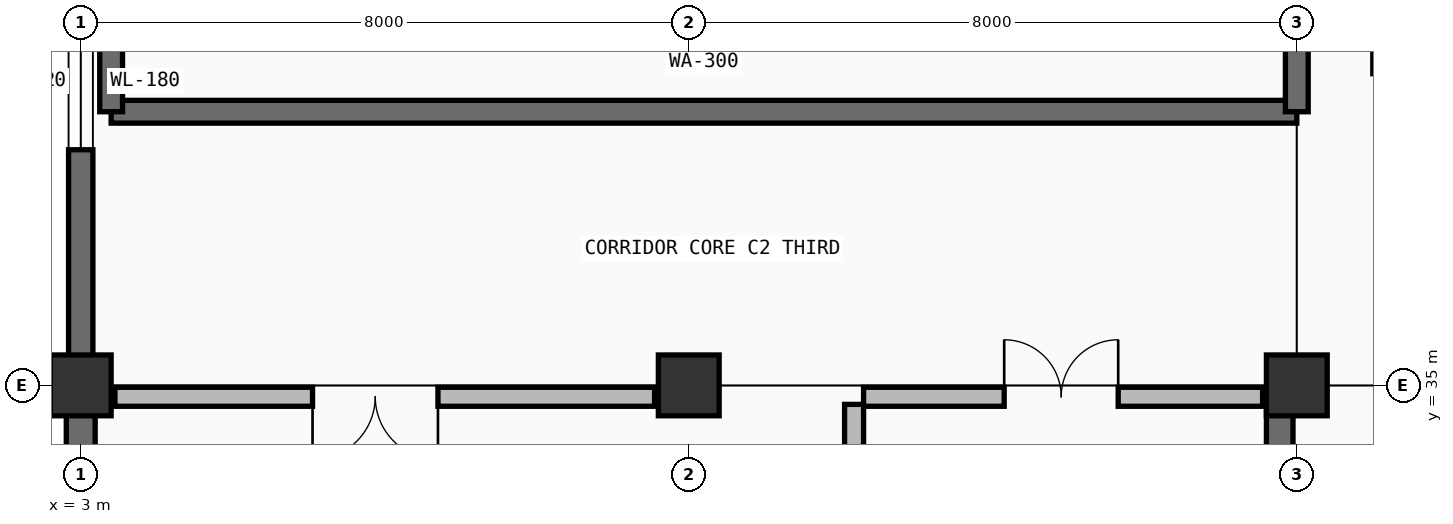
"""IFC4 building model, lengths in metres.
Left out: names, types, materials, properties, quantities, classifications, styles, units other than length and angle.
Written with IfcOpenShell. Run it as: python <this file> out.ifc"""

import sys

from ifc_helpers import new_model, si_unit, direction, frame, frame_2d, origin, origin_2d, place, context, subcontext, project, spatial, rectangle, extrude, element, fill, save


model = new_model("IFC4")
c1 = context("Model", 3, precision=1e-05, world=origin(), true_north=direction((0.0, 1.0)))
c2 = subcontext(c1, "Body", "Model", "MODEL_VIEW")
j1 = project(units=[si_unit("LENGTHUNIT", "METRE"), si_unit("PLANEANGLEUNIT", "RADIAN")], contexts=[c1])
p1 = place(None, origin())
s1 = spatial("IfcSite", under=j1, at=p1, CompositionType="ELEMENT")
p2 = place(p1, origin())
s2 = spatial("IfcBuilding", under=s1, at=p2, CompositionType="ELEMENT")
p3 = place(p2, frame((0.0, 0.0, 14.4)))
s3 = spatial("IfcBuildingStorey", under=s2, at=p3, CompositionType="ELEMENT", Elevation=14.4)
for number, where, z_axis, x_axis in (
    (1, (3.0, 35.0, 0.0), (0.0, 0.0, 1.0), (1.0, 0.0, 0.0)),
    (2, (11.0, 35.0, 0.0), (0.0, 0.0, 1.0), (1.0, 0.0, 0.0)),
    (3, (19.0, 35.0, 0.0), (0.0, 0.0, 1.0), (1.0, 0.0, 0.0)),
):
    element("IfcColumn", number, at=place(p3, frame(where, z_axis=z_axis, x_axis=x_axis)), inside=s3, PredefinedType="COLUMN", context=c2, shape_type="SweptSolid", body=[
        extrude(rectangle(XDim=0.8, YDim=0.8, at=origin_2d()), origin(), (0.0, 0.0, 1.0), 4.5),
    ])
p4 = place(p3, frame((3.0, 27.0, 0.0), z_axis=(0.0, 0.0, 1.0), x_axis=(0.0, 1.0, 0.0)))
e4 = element("IfcWall", 4, at=p4, inside=s3, PredefinedType="SOLIDWALL", context=c2, shape_type="SweptSolid", body=[
    extrude(rectangle(XDim=8.0, YDim=0.38, at=frame_2d((4.0, 0.0))), origin(), (0.0, 0.0, 1.0), 4.5),
])
p5 = place(p3, frame((3.0, 35.0, 0.0), z_axis=(0.0, 0.0, 1.0), x_axis=(0.0, 1.0, 0.0)))
e5 = element("IfcWall", 5, at=p5, inside=s3, PredefinedType="SOLIDWALL", context=c2, shape_type="SweptSolid", body=[
    extrude(rectangle(XDim=8.0, YDim=0.32, at=frame_2d((4.0, 0.0))), origin(), (0.0, 0.0, 1.0), 4.5),
])
p6 = place(p5, frame((3.1, 0.0, 1.1)))
e6 = element("IfcOpeningElement", 6, at=p6, cuts=e5, PredefinedType="OPENING", context=c2, shape_type="SweptSolid", body=[
    extrude(rectangle(XDim=1.8, YDim=0.85, at=frame_2d((0.9, 0.425))), frame((0.0, 0.17, 0.0), z_axis=(0.0, -1.0, 0.0), x_axis=(1.0, 0.0, 0.0)), (0.0, 0.0, 1.0), 0.34),
])
p7 = place(p3, frame((18.775, 27.2, 0.0), z_axis=(0.0, 0.0, 1.0), x_axis=(0.0, 1.0, 0.0)))
e7 = element("IfcWall", 7, at=p7, inside=s3, PredefinedType="SHEAR", context=c2, shape_type="SweptSolid", body=[
    extrude(rectangle(XDim=7.6, YDim=0.35, at=frame_2d((3.8, 0.0))), origin(), (0.0, 0.0, 1.0), 4.2),
])
p8 = place(p7, frame((5.1, 0.0, 0.0)))
e8 = element("IfcOpeningElement", 8, at=p8, cuts=e7, PredefinedType="OPENING", context=c2, shape_type="SweptSolid", body=[
    extrude(rectangle(XDim=1.5, YDim=2.2, at=frame_2d((0.75, 1.1))), frame((0.0, 0.185, 0.0), z_axis=(0.0, -1.0, 0.0), x_axis=(1.0, 0.0, 0.0)), (0.0, 0.0, 1.0), 0.37),
])
p9 = place(p3, frame((13.175, 31.775, 0.0), z_axis=(0.0, 0.0, 1.0), x_axis=(0.0, 1.0, 0.0)))
e9 = element("IfcWall", 9, at=p9, inside=s3, PredefinedType="PARTITIONING", context=c2, shape_type="SweptSolid", body=[
    extrude(rectangle(XDim=2.975, YDim=0.25, at=frame_2d((1.488, 0.0))), origin(), (0.0, 0.0, 1.0), 4.2),
])
p10 = place(p9, frame((0.45, 0.0, 0.0)))
e10 = element("IfcOpeningElement", 10, at=p10, cuts=e9, PredefinedType="OPENING", context=c2, shape_type="SweptSolid", body=[
    extrude(rectangle(XDim=1.2, YDim=2.2, at=frame_2d((0.6, 1.1))), frame((0.0, 0.135, 0.0), z_axis=(0.0, -1.0, 0.0), x_axis=(1.0, 0.0, 0.0)), (0.0, 0.0, 1.0), 0.27),
])
p11 = place(p3, frame((3.45, 34.85, 0.0), z_axis=(0.0, 0.0, 1.0), x_axis=(1.0, 0.0, 0.0)))
e11 = element("IfcWall", 11, at=p11, inside=s3, PredefinedType="PARTITIONING", context=c2, shape_type="SweptSolid", body=[
    extrude(rectangle(XDim=7.1, YDim=0.25, at=frame_2d((3.55, 0.0))), origin(), (0.0, 0.0, 1.0), 3.535),
])
p12 = place(p11, frame((2.6, 0.0, 0.0)))
e12 = element("IfcOpeningElement", 12, at=p12, cuts=e11, PredefinedType="OPENING", context=c2, shape_type="SweptSolid", body=[
    extrude(rectangle(XDim=1.65, YDim=2.25, at=frame_2d((0.825, 1.125))), frame((0.0, 0.135, 0.0), z_axis=(0.0, -1.0, 0.0), x_axis=(1.0, 0.0, 0.0)), (0.0, 0.0, 1.0), 0.27),
])
p13 = place(p3, frame((13.3, 34.85, 0.0), z_axis=(0.0, 0.0, 1.0), x_axis=(1.0, 0.0, 0.0)))
e13 = element("IfcWall", 13, at=p13, inside=s3, PredefinedType="PARTITIONING", context=c2, shape_type="SweptSolid", body=[
    extrude(rectangle(XDim=5.25, YDim=0.25, at=frame_2d((2.625, 0.0))), origin(), (0.0, 0.0, 1.0), 3.535),
])
p14 = place(p13, frame((1.85, 0.0, 0.0)))
e14 = element("IfcOpeningElement", 14, at=p14, cuts=e13, PredefinedType="OPENING", context=c2, shape_type="SweptSolid", body=[
    extrude(rectangle(XDim=1.5, YDim=2.2, at=frame_2d((0.75, 1.1))), frame((0.0, 0.135, 0.0), z_axis=(0.0, -1.0, 0.0), x_axis=(1.0, 0.0, 0.0)), (0.0, 0.0, 1.0), 0.27),
])
p15 = place(p3, frame((3.4, 38.6, 0.0), z_axis=(0.0, 0.0, 1.0), x_axis=(1.0, 0.0, 0.0)))
e15 = element("IfcWall", 15, at=p15, inside=s3, PredefinedType="SHEAR", context=c2, shape_type="SweptSolid", body=[
    extrude(rectangle(XDim=15.6, YDim=0.3, at=frame_2d((7.8, 0.0))), origin(), (0.0, 0.0, 1.0), 4.2),
])
p16 = place(p3, frame((19.0, 38.6, 0.0), z_axis=(0.0, 0.0, 1.0), x_axis=(0.0, 1.0, 0.0)))
e16 = element("IfcWall", 16, at=p16, inside=s3, PredefinedType="SHEAR", context=c2, shape_type="SweptSolid", body=[
    extrude(rectangle(XDim=13.4, YDim=0.3, at=frame_2d((6.7, 0.0))), origin(), (0.0, 0.0, 1.0), 4.2),
])
p17 = place(p16, frame((7.674, 0.0, 0.0)))
e17 = element("IfcOpeningElement", 17, at=p17, cuts=e16, PredefinedType="OPENING", context=c2, shape_type="SweptSolid", body=[
    extrude(rectangle(XDim=1.5, YDim=2.2, at=frame_2d((0.75, 1.1))), frame((0.0, 0.16, 0.0), z_axis=(0.0, -1.0, 0.0), x_axis=(1.0, 0.0, 0.0)), (0.0, 0.0, 1.0), 0.32),
])
p18 = place(p3, frame((3.4, 38.6, 0.0), z_axis=(0.0, 0.0, 1.0), x_axis=(0.0, 1.0, 0.0)))
e18 = element("IfcWall", 18, at=p18, inside=s3, PredefinedType="SHEAR", context=c2, shape_type="SweptSolid", body=[
    extrude(rectangle(XDim=13.4, YDim=0.3, at=frame_2d((6.7, 0.0))), origin(), (0.0, 0.0, 1.0), 4.2),
])
p19 = place(p6, origin())
e19 = element("IfcWindow", 19, at=p19, inside=s3, PartitioningType="SINGLE_PANEL", PredefinedType="WINDOW", context=c2, shape_type="SweptSolid", body=[
    extrude(rectangle(XDim=1.8, YDim=0.85, at=frame_2d((0.9, 0.425))), frame((0.0, 0.03, 0.0), z_axis=(0.0, -1.0, 0.0), x_axis=(1.0, 0.0, 0.0)), (0.0, 0.0, 1.0), 0.06),
])
fill(e6, e19)
p20 = place(p12, frame((1.65, 0.0, 0.0), z_axis=(0.0, 0.0, 1.0), x_axis=(-1.0, 0.0, 0.0)))
e20 = element("IfcDoor", 20, at=p20, inside=s3, OperationType="DOUBLE_DOOR_SINGLE_SWING", PredefinedType="DOOR", context=c2, shape_type="SweptSolid", body=[
    extrude(rectangle(XDim=1.65, YDim=2.25, at=frame_2d((0.825, 1.125))), frame((0.0, 0.025, 0.0), z_axis=(0.0, -1.0, 0.0), x_axis=(1.0, 0.0, 0.0)), (0.0, 0.0, 1.0), 0.05),
])
fill(e12, e20)
p21 = place(p14, origin())
e21 = element("IfcDoor", 21, at=p21, inside=s3, OperationType="DOUBLE_DOOR_SINGLE_SWING", PredefinedType="DOOR", context=c2, shape_type="SweptSolid", body=[
    extrude(rectangle(XDim=1.5, YDim=2.2, at=frame_2d((0.75, 1.1))), frame((0.0, 0.025, 0.0), z_axis=(0.0, -1.0, 0.0), x_axis=(1.0, 0.0, 0.0)), (0.0, 0.0, 1.0), 0.05),
])
fill(e14, e21)
save(model, sys.argv[1])
